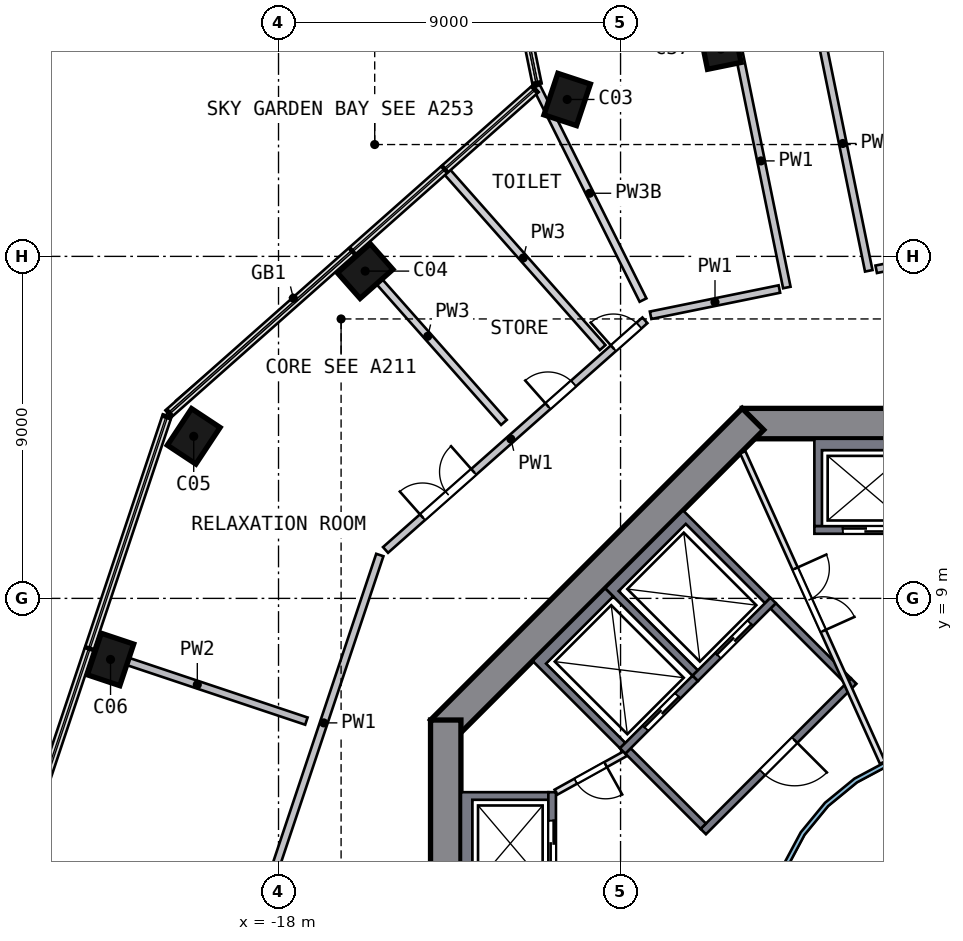
"""IFC4 building model, lengths in metres.
Left out: names, types, materials, properties, quantities, classifications, styles, units other than length and angle.
Written with IfcOpenShell. Run it as: python <this file> out.ifc"""

import sys

from ifc_helpers import new_model, si_unit, direction, frame, frame_2d, origin, origin_2d, place, context, subcontext, project, spatial, polyline, rectangle, outline, extrude, element, fill, save


model = new_model("IFC4")
c1 = context("Model", 3, precision=1e-05, world=origin(), true_north=direction((0.0, 1.0)))
c2 = subcontext(c1, "Body", "Model", "MODEL_VIEW")
j1 = project(units=[si_unit("LENGTHUNIT", "METRE"), si_unit("PLANEANGLEUNIT", "RADIAN")], contexts=[c1])
p1 = place(None, origin())
s1 = spatial("IfcSite", under=j1, at=p1, CompositionType="ELEMENT")
p2 = place(p1, origin())
s2 = spatial("IfcBuilding", under=s1, at=p2, CompositionType="ELEMENT")
p3 = place(p2, frame((0.0, 0.0, 81.0)))
s3 = spatial("IfcBuildingStorey", under=s2, at=p3, CompositionType="ELEMENT", Elevation=81.0)
p4 = place(p3, frame((-10.316, 22.171, 0.0), z_axis=(-0.073724949, -0.035072531, 0.996661703), x_axis=(0.313129185, 0.948026988, 0.056523832)))
e1 = element("IfcColumn", 1, at=p4, inside=s3, PredefinedType="COLUMN", context=c2, shape_type="SweptSolid", body=[
    extrude(rectangle(XDim=1.15, YDim=0.9, at=origin_2d()), origin(), (0.0, 0.0, 1.0), 4.706),
])
p5 = place(p3, frame((-15.649, 17.676, 0.0), z_axis=(-0.058640346, -0.052724417, 0.996885874), x_axis=(-0.746898066, -0.660246291, -0.078855026)))
e2 = element("IfcColumn", 2, at=p5, inside=s3, PredefinedType="COLUMN", context=c2, shape_type="SweptSolid", body=[
    extrude(rectangle(XDim=1.15, YDim=0.9, at=origin_2d()), origin(), (0.0, 0.0, 1.0), 4.705),
])
p6 = place(p3, frame((-20.179, 13.346, 0.0), z_axis=(-0.043999359, -0.067763164, 0.996730761), x_axis=(0.549832111, 0.831358719, 0.080791885)))
e3 = element("IfcColumn", 3, at=p6, inside=s3, PredefinedType="COLUMN", context=c2, shape_type="SweptSolid", body=[
    extrude(rectangle(XDim=1.15, YDim=0.9, at=origin_2d()), origin(), (0.0, 0.0, 1.0), 4.705),
])
p7 = place(p3, frame((-22.391, 7.483, 0.0), z_axis=(-0.024338376, -0.074987109, 0.996887444), x_axis=(-0.31573538, -0.945566595, -0.07883517)))
e4 = element("IfcColumn", 4, at=p7, inside=s3, PredefinedType="COLUMN", context=c2, shape_type="SweptSolid", body=[
    extrude(rectangle(XDim=1.15, YDim=0.9, at=origin_2d()), origin(), (0.0, 0.0, 1.0), 4.705),
])
p8 = place(p3, frame((-6.265, 23.48, 0.0), z_axis=(-0.078241786, -0.021583941, 0.996700736), x_axis=(-0.200169517, 0.979745823, 0.005503312)))
e5 = element("IfcColumn", 5, at=p8, inside=s3, PredefinedType="COLUMN", context=c2, shape_type="SweptSolid", body=[
    extrude(rectangle(XDim=0.9, YDim=0.9, at=origin_2d()), origin(), (0.0, 0.0, 1.0), 4.706),
])
p9 = place(p3, frame((5.799, 13.6, 0.0), z_axis=(0.0, 0.0, 1.0), x_axis=(-1.0, 0.0, 0.0)))
e6 = element("IfcWall", 6, at=p9, inside=s3, PredefinedType="SHEAR", context=c2, shape_type="SweptSolid", body=[
    extrude(rectangle(XDim=11.598, YDim=0.8, at=frame_2d((5.799, 0.0))), origin(), (0.0, 0.0, 1.0), 5.0),
])
p10 = place(p9, frame((4.899, 0.0, 0.0)))
e7 = element("IfcOpeningElement", 7, at=p10, cuts=e6, PredefinedType="OPENING", context=c2, shape_type="SweptSolid", body=[
    extrude(rectangle(XDim=1.8, YDim=2.1, at=frame_2d((0.9, 1.05))), frame((0.0, 0.41, 0.0), z_axis=(0.0, -1.0, 0.0), x_axis=(1.0, 0.0, 0.0)), (0.0, 0.0, 1.0), 0.82),
])
p11 = place(p3, frame((-5.516, 13.717, 0.0), z_axis=(0.0, 0.0, 1.0), x_axis=(-0.707106781, -0.707106781, 0.0)))
e8 = element("IfcWall", 8, at=p11, inside=s3, PredefinedType="SHEAR", context=c2, shape_type="SweptSolid", body=[
    extrude(rectangle(XDim=11.598, YDim=0.8, at=frame_2d((5.799, 0.0))), origin(), (0.0, 0.0, 1.0), 5.0),
])
p12 = place(p3, frame((-13.6, 5.799, 0.0), z_axis=(0.0, 0.0, 1.0), x_axis=(0.0, -1.0, 0.0)))
e9 = element("IfcWall", 9, at=p12, inside=s3, PredefinedType="SHEAR", context=c2, shape_type="SweptSolid", body=[
    extrude(rectangle(XDim=11.598, YDim=0.8, at=frame_2d((5.799, 0.0))), origin(), (0.0, 0.0, 1.0), 5.0),
])
p13 = place(p12, frame((4.899, 0.0, 0.0)))
e10 = element("IfcOpeningElement", 10, at=p13, cuts=e9, PredefinedType="OPENING", context=c2, shape_type="SweptSolid", body=[
    extrude(rectangle(XDim=1.8, YDim=2.1, at=frame_2d((0.9, 1.05))), frame((0.0, 0.41, 0.0), z_axis=(0.0, -1.0, 0.0), x_axis=(1.0, 0.0, 0.0)), (0.0, 0.0, 1.0), 0.82),
])
p14 = place(p3, origin())
e11 = element("IfcWall", 11, at=p14, inside=s3, PredefinedType="SOLIDWALL", context=c2, shape_type="SweptSolid", body=[
    extrude(outline(polyline([(-3.9, 10.9), (-3.9, 13.2), (-1.2, 13.2), (-1.2, 10.9), (-1.4, 10.9), (-1.4, 12.9), (-3.7, 12.9), (-3.7, 10.9), (-3.9, 10.9)])), origin(), (0.0, 0.0, 1.0), 4.69),
])
p15 = place(p3, frame((-1.2, 10.8, 0.0), z_axis=(0.0, 0.0, 1.0), x_axis=(-1.0, 0.0, 0.0)))
e12 = element("IfcWall", 12, at=p15, inside=s3, PredefinedType="SOLIDWALL", context=c2, shape_type="SweptSolid", body=[
    extrude(rectangle(XDim=2.7, YDim=0.2, at=frame_2d((1.35, 0.0))), origin(), (0.0, 0.0, 1.0), 4.69),
])
p16 = place(p15, frame((0.75, 0.0, 0.0)))
e13 = element("IfcOpeningElement", 13, at=p16, cuts=e12, PredefinedType="OPENING", context=c2, shape_type="SweptSolid", body=[
    extrude(rectangle(XDim=1.2, YDim=2.1, at=frame_2d((0.6, 1.05))), frame((0.0, 0.11, 0.0), z_axis=(0.0, -1.0, 0.0), x_axis=(1.0, 0.0, 0.0)), (0.0, 0.0, 1.0), 0.22),
])
p17 = place(p3, origin())
e14 = element("IfcWall", 14, at=p17, inside=s3, PredefinedType="SOLIDWALL", context=c2, shape_type="SweptSolid", body=[
    extrude(outline(polyline([(-13.2, 3.9), (-10.9, 3.9), (-10.9, 3.7), (-12.9, 3.7), (-12.9, 1.4), (-10.9, 1.4), (-10.9, 1.2), (-13.2, 1.2), (-13.2, 3.9)])), origin(), (0.0, 0.0, 1.0), 4.69),
])
p18 = place(p3, frame((-10.8, 1.2, 0.0), z_axis=(0.0, 0.0, 1.0), x_axis=(0.0, 1.0, 0.0)))
e15 = element("IfcWall", 15, at=p18, inside=s3, PredefinedType="SOLIDWALL", context=c2, shape_type="SweptSolid", body=[
    extrude(rectangle(XDim=2.7, YDim=0.2, at=frame_2d((1.35, 0.0))), origin(), (0.0, 0.0, 1.0), 4.69),
])
p19 = place(p18, frame((0.75, 0.0, 0.0)))
e16 = element("IfcOpeningElement", 16, at=p19, cuts=e15, PredefinedType="OPENING", context=c2, shape_type="SweptSolid", body=[
    extrude(rectangle(XDim=1.2, YDim=2.1, at=frame_2d((0.6, 1.05))), frame((0.0, 0.11, 0.0), z_axis=(0.0, -1.0, 0.0), x_axis=(1.0, 0.0, 0.0)), (0.0, 0.0, 1.0), 0.22),
])
p20 = place(p3, origin())
e17 = element("IfcWall", 17, at=p20, inside=s3, PredefinedType="SOLIDWALL", context=c2, shape_type="SweptSolid", body=[
    extrude(outline(polyline([(-9.405, 9.263), (-7.354, 11.314), (-5.056, 9.016), (-5.197, 8.874), (-7.283, 10.96), (-9.051, 9.192), (-6.965, 7.106), (-7.106, 6.965), (-9.405, 9.263)])), origin(), (0.0, 0.0, 1.0), 4.69),
])
p21 = place(p3, frame((-4.985, 8.945, 0.0), z_axis=(0.0, 0.0, 1.0), x_axis=(-0.707106781, -0.707106781, 0.0)))
e18 = element("IfcWall", 18, at=p21, inside=s3, PredefinedType="SOLIDWALL", context=c2, shape_type="SweptSolid", body=[
    extrude(rectangle(XDim=2.9, YDim=0.2, at=frame_2d((1.45, 0.0))), origin(), (0.0, 0.0, 1.0), 4.69),
])
p22 = place(p21, frame((0.85, 0.0, 0.0)))
e19 = element("IfcOpeningElement", 19, at=p22, cuts=e18, PredefinedType="OPENING", context=c2, shape_type="SweptSolid", body=[
    extrude(rectangle(XDim=1.2, YDim=2.1, at=frame_2d((0.6, 1.05))), frame((0.0, 0.11, 0.0), z_axis=(0.0, -1.0, 0.0), x_axis=(1.0, 0.0, 0.0)), (0.0, 0.0, 1.0), 0.22),
])
p23 = place(p3, origin())
e20 = element("IfcWall", 20, at=p23, inside=s3, PredefinedType="SOLIDWALL", context=c2, shape_type="SweptSolid", body=[
    extrude(outline(polyline([(-11.314, 7.354), (-9.405, 9.263), (-9.192, 9.051), (-10.96, 7.283), (-8.874, 5.197), (-9.016, 5.056), (-11.314, 7.354)])), origin(), (0.0, 0.0, 1.0), 4.69),
])
p24 = place(p3, frame((-7.036, 6.894, 0.0), z_axis=(0.0, 0.0, 1.0), x_axis=(-0.707106781, -0.707106781, 0.0)))
e21 = element("IfcWall", 21, at=p24, inside=s3, PredefinedType="SOLIDWALL", context=c2, shape_type="SweptSolid", body=[
    extrude(rectangle(XDim=2.7, YDim=0.2, at=frame_2d((1.35, 0.0))), origin(), (0.0, 0.0, 1.0), 4.69),
])
p25 = place(p24, frame((0.65, 0.0, 0.0)))
e22 = element("IfcOpeningElement", 22, at=p25, cuts=e21, PredefinedType="OPENING", context=c2, shape_type="SweptSolid", body=[
    extrude(rectangle(XDim=1.2, YDim=2.1, at=frame_2d((0.6, 1.05))), frame((0.0, 0.11, 0.0), z_axis=(0.0, -1.0, 0.0), x_axis=(1.0, 0.0, 0.0)), (0.0, 0.0, 1.0), 0.22),
])
p26 = place(p3, frame((-2.864, 6.823, 0.0), z_axis=(0.0, 0.0, 1.0), x_axis=(-0.707106781, -0.707106781, 0.0)))
e23 = element("IfcWall", 23, at=p26, inside=s3, PredefinedType="SOLIDWALL", context=c2, shape_type="SweptSolid", body=[
    extrude(rectangle(XDim=5.6, YDim=0.2, at=frame_2d((2.8, 0.0))), origin(), (0.0, 0.0, 1.0), 4.69),
])
p27 = place(p26, frame((2.2, 0.0, 0.0)))
e24 = element("IfcOpeningElement", 24, at=p27, cuts=e23, PredefinedType="OPENING", context=c2, shape_type="SweptSolid", body=[
    extrude(rectangle(XDim=1.2, YDim=2.1, at=frame_2d((0.6, 1.05))), frame((0.0, 0.11, 0.0), z_axis=(0.0, -1.0, 0.0), x_axis=(1.0, 0.0, 0.0)), (0.0, 0.0, 1.0), 0.22),
])
for number, where, z_axis, x_axis in (
    (25, (-3.005, 6.823, 0.0), (0.0, 0.0, 1.0), (-0.707, 0.707, 0.0)),
    (26, (-6.823, 3.005, 0.0), (0.0, 0.0, 1.0), (-0.707, 0.707, 0.0)),
):
    element("IfcWall", number, at=place(p3, frame(where, z_axis=z_axis, x_axis=x_axis)), inside=s3, PredefinedType="SOLIDWALL", context=c2, shape_type="SweptSolid", body=[
        extrude(rectangle(XDim=2.8, YDim=0.2, at=frame_2d((1.4, 0.0))), origin(), (0.0, 0.0, 1.0), 4.69),
    ])
p28 = place(p3, frame((-8.874, 4.914, 0.0), z_axis=(0.0, 0.0, 1.0), x_axis=(-0.874129705, -0.485692555, 0.0)))
e27 = element("IfcWall", 27, at=p28, inside=s3, PredefinedType="PARTITIONING", context=c2, shape_type="SweptSolid", body=[
    extrude(rectangle(XDim=2.089, YDim=0.15, at=frame_2d((1.044, 0.0))), origin(), (0.0, 0.0, 1.0), 4.69),
])
p29 = place(p28, frame((0.594, 0.0, 0.0)))
e28 = element("IfcOpeningElement", 28, at=p29, cuts=e27, PredefinedType="OPENING", context=c2, shape_type="SweptSolid", body=[
    extrude(rectangle(XDim=0.9, YDim=2.1, at=frame_2d((0.45, 1.05))), frame((0.0, 0.085, 0.0), z_axis=(0.0, -1.0, 0.0), x_axis=(1.0, 0.0, 0.0)), (0.0, 0.0, 1.0), 0.17),
])
p30 = place(p3, frame((-5.784, 12.844, 0.0), z_axis=(0.0, 0.0, 1.0), x_axis=(0.41058002, -0.91182457, 0.0)))
e29 = element("IfcWall", 29, at=p30, inside=s3, PredefinedType="PARTITIONING", context=c2, shape_type="SweptSolid", body=[
    extrude(rectangle(XDim=8.956, YDim=0.15, at=frame_2d((4.478, 0.0))), origin(), (0.0, 0.0, 1.0), 4.69),
])
p31 = place(p30, frame((3.356, 0.0, 0.0)))
e30 = element("IfcOpeningElement", 30, at=p31, cuts=e29, PredefinedType="OPENING", context=c2, shape_type="SweptSolid", body=[
    extrude(rectangle(XDim=1.8, YDim=2.1, at=frame_2d((0.9, 1.05))), frame((0.0, 0.085, 0.0), z_axis=(0.0, -1.0, 0.0), x_axis=(1.0, 0.0, 0.0)), (0.0, 0.0, 1.0), 0.17),
])
p32 = place(p3, origin())
e31 = element("IfcWall", 31, at=p32, inside=s3, PredefinedType="SOLIDWALL", context=c2, shape_type="SweptSolid", body=[
    extrude(outline(polyline([(5.021, -0.999), (4.73, -1.959), (4.257, -2.844), (3.62, -3.62), (2.844, -4.257), (1.959, -4.73), (0.999, -5.021), (0.0, -5.12), (-0.999, -5.021), (-1.959, -4.73), (-2.844, -4.257), (-3.62, -3.62), (-4.257, -2.844), (-4.73, -1.959), (-5.021, -0.999), (-5.12, 0.0), (-5.021, 0.999), (-4.73, 1.959), (-4.257, 2.844), (-3.62, 3.62), (-2.844, 4.257), (-1.959, 4.73), (-0.999, 5.021), (0.0, 5.12), (0.999, 5.021), (1.959, 4.73), (2.844, 4.257), (3.62, 3.62), (4.257, 2.844), (4.73, 1.959), (5.021, 0.999), (5.12, 0.0), (5.021, -0.999)]), holes=[polyline([(4.904, 0.976), (4.619, 1.913), (4.157, 2.778), (3.535, 3.535), (2.778, 4.157), (1.913, 4.619), (0.976, 4.904), (0.0, 5.0), (-0.976, 4.904), (-1.913, 4.619), (-2.778, 4.157), (-3.535, 3.535), (-4.157, 2.778), (-4.619, 1.913), (-4.904, 0.976), (-5.0, 0.0), (-4.904, -0.976), (-4.619, -1.913), (-4.157, -2.778), (-3.535, -3.535), (-2.778, -4.157), (-1.913, -4.619), (-0.976, -4.904), (0.0, -5.0), (0.976, -4.904), (1.913, -4.619), (2.778, -4.157), (3.535, -3.535), (4.157, -2.778), (4.619, -1.913), (4.904, -0.976), (5.0, 0.0), (4.904, 0.976)])]), origin(), (0.0, 0.0, 1.0), 4.69),
])
p33 = place(p3, frame((-15.334, 10.141, 0.0), z_axis=(0.0, 0.0, 1.0), x_axis=(-0.316982448, -0.948431404, 0.0)))
e32 = element("IfcWall", 32, at=p33, inside=s3, PredefinedType="SOLIDWALL", context=c2, shape_type="SweptSolid", body=[
    extrude(rectangle(XDim=9.316, YDim=0.2, at=frame_2d((4.658, 0.0))), origin(), (0.0, 0.0, 1.0), 4.69),
])
p34 = place(p3, frame((-15.184, 10.275, 0.0), z_axis=(0.0, 0.0, 1.0), x_axis=(0.748733244, 0.662871428, 0.0)))
e33 = element("IfcWall", 33, at=p34, inside=s3, PredefinedType="SOLIDWALL", context=c2, shape_type="SweptSolid", body=[
    extrude(rectangle(XDim=9.116, YDim=0.2, at=frame_2d((4.558, 0.0))), origin(), (0.0, 0.0, 1.0), 4.69),
])
p35 = place(p34, frame((1.3, 0.0, 0.0)))
e34 = element("IfcOpeningElement", 34, at=p35, cuts=e33, PredefinedType="OPENING", context=c2, shape_type="SweptSolid", body=[
    extrude(rectangle(XDim=1.8, YDim=2.1, at=frame_2d((0.9, 1.05))), frame((0.0, 0.11, 0.0), z_axis=(0.0, -1.0, 0.0), x_axis=(1.0, 0.0, 0.0)), (0.0, 0.0, 1.0), 0.22),
])
p36 = place(p34, frame((8.008, 0.0, 0.0)))
e35 = element("IfcOpeningElement", 35, at=p36, cuts=e33, PredefinedType="OPENING", context=c2, shape_type="SweptSolid", body=[
    extrude(rectangle(XDim=0.9, YDim=2.1, at=frame_2d((0.45, 1.05))), frame((0.0, 0.11, 0.0), z_axis=(0.0, -1.0, 0.0), x_axis=(1.0, 0.0, 0.0)), (0.0, 0.0, 1.0), 0.22),
])
p37 = place(p34, frame((5.708, 0.0, 0.0)))
e36 = element("IfcOpeningElement", 36, at=p37, cuts=e33, PredefinedType="OPENING", context=c2, shape_type="SweptSolid", body=[
    extrude(rectangle(XDim=0.9, YDim=2.1, at=frame_2d((0.45, 1.05))), frame((0.0, 0.11, 0.0), z_axis=(0.0, -1.0, 0.0), x_axis=(1.0, 0.0, 0.0)), (0.0, 0.0, 1.0), 0.22),
])
p38 = place(p3, frame((-4.82, 17.141, 0.0), z_axis=(0.0, 0.0, 1.0), x_axis=(-0.979840736, -0.199780208, 0.0)))
e37 = element("IfcWall", 37, at=p38, inside=s3, PredefinedType="SOLIDWALL", context=c2, shape_type="SweptSolid", body=[
    extrude(rectangle(XDim=3.458, YDim=0.2, at=frame_2d((1.729, 0.0))), origin(), (0.0, 0.0, 1.0), 4.69),
])
p39 = place(p3, frame((-4.625, 17.181, 0.0), z_axis=(0.0, 0.0, 1.0), x_axis=(-0.199700098, 0.979857066, 0.0)))
e38 = element("IfcWall", 38, at=p39, inside=s3, PredefinedType="SOLIDWALL", context=c2, shape_type="SweptSolid", body=[
    extrude(rectangle(XDim=14.392, YDim=0.2, at=frame_2d((7.196, 0.0))), origin(), (0.0, 0.0, 1.0), 4.69),
])
p40 = place(p39, frame((7.0, 0.0, 0.0)))
e39 = element("IfcOpeningElement", 39, at=p40, cuts=e38, PredefinedType="OPENING", context=c2, shape_type="SweptSolid", body=[
    extrude(rectangle(XDim=1.0, YDim=2.1, at=frame_2d((0.5, 1.05))), frame((0.0, 0.11, 0.0), z_axis=(0.0, -1.0, 0.0), x_axis=(1.0, 0.0, 0.0)), (0.0, 0.0, 1.0), 0.22),
])
p41 = place(p3, frame((-5.342, 31.72, 0.0), z_axis=(0.0, 0.0, 1.0), x_axis=(0.199694078, -0.979858293, 0.0)))
e40 = element("IfcWall", 40, at=p41, inside=s3, PredefinedType="SOLIDWALL", context=c2, shape_type="SweptSolid", body=[
    extrude(rectangle(XDim=14.39, YDim=0.2, at=frame_2d((7.195, 0.0))), origin(), (0.0, 0.0, 1.0), 4.69),
])
p42 = place(p41, frame((5.55, 0.0, 0.0)))
e41 = element("IfcOpeningElement", 41, at=p42, cuts=e40, PredefinedType="OPENING", context=c2, shape_type="SweptSolid", body=[
    extrude(rectangle(XDim=1.8, YDim=2.1, at=frame_2d((0.9, 1.05))), frame((0.0, 0.11, 0.0), z_axis=(0.0, -1.0, 0.0), x_axis=(1.0, 0.0, 0.0)), (0.0, 0.0, 1.0), 0.22),
])
p43 = place(p3, frame((1.116, 18.351, 0.0), z_axis=(0.0, 0.0, 1.0), x_axis=(-0.979854553, -0.19971243, 0.0)))
e42 = element("IfcWall", 42, at=p43, inside=s3, PredefinedType="SOLIDWALL", context=c2, shape_type="SweptSolid", body=[
    extrude(rectangle(XDim=3.458, YDim=0.2, at=frame_2d((1.729, 0.0))), origin(), (0.0, 0.0, 1.0), 4.69),
])
p44 = place(p3, frame((-17.267, 5.771, 0.0), z_axis=(0.0, 0.0, 1.0), x_axis=(-0.948436957, 0.316965832, 0.0)))
e43 = element("IfcWall", 43, at=p44, inside=s3, PredefinedType="SOLIDWALL", context=c2, shape_type="SweptSolid", body=[
    extrude(rectangle(XDim=6.052, YDim=0.2, at=frame_2d((3.026, 0.0))), origin(), (0.0, 0.0, 1.0), 4.69),
])
p45 = place(p3, frame((-16.08, 18.163, 0.0), z_axis=(0.0, 0.0, 1.0), x_axis=(0.662885401, -0.748720872, 0.0)))
e44 = element("IfcWall", 44, at=p45, inside=s3, PredefinedType="SOLIDWALL", context=c2, shape_type="SweptSolid", body=[
    extrude(rectangle(XDim=6.053, YDim=0.2, at=frame_2d((3.026, 0.0))), origin(), (0.0, 0.0, 1.0), 4.69),
])
p46 = place(p3, frame((-9.471, 15.6, 0.0), z_axis=(0.0, 0.0, 1.0), x_axis=(-0.662863979, 0.748739838, 0.0)))
e45 = element("IfcWall", 45, at=p46, inside=s3, PredefinedType="SOLIDWALL", context=c2, shape_type="SweptSolid", body=[
    extrude(rectangle(XDim=6.3, YDim=0.2, at=frame_2d((3.15, 0.0))), origin(), (0.0, 0.0, 1.0), 4.69),
])
p47 = place(p3, frame((-8.409, 16.851, 0.0), z_axis=(0.0, 0.0, 1.0), x_axis=(-0.446513898, 0.894776698, 0.0)))
e46 = element("IfcWall", 46, at=p47, inside=s3, PredefinedType="SOLIDWALL", context=c2, shape_type="SweptSolid", body=[
    extrude(rectangle(XDim=6.282, YDim=0.2, at=frame_2d((3.141, 0.0))), origin(), (0.0, 0.0, 1.0), 4.19),
])
p48 = place(p16, origin())
e47 = element("IfcDoor", 47, at=p48, inside=s3, OperationType="DOUBLE_DOOR_SLIDING", PredefinedType="DOOR", context=c2, shape_type="SweptSolid", body=[
    extrude(rectangle(XDim=1.2, YDim=2.1, at=frame_2d((0.6, 1.05))), frame((0.0, 0.025, 0.0), z_axis=(0.0, -1.0, 0.0), x_axis=(1.0, 0.0, 0.0)), (0.0, 0.0, 1.0), 0.05),
])
fill(e13, e47)
p49 = place(p19, origin())
e48 = element("IfcDoor", 48, at=p49, inside=s3, OperationType="DOUBLE_DOOR_SLIDING", PredefinedType="DOOR", context=c2, shape_type="SweptSolid", body=[
    extrude(rectangle(XDim=1.2, YDim=2.1, at=frame_2d((0.6, 1.05))), frame((0.0, 0.025, 0.0), z_axis=(0.0, -1.0, 0.0), x_axis=(1.0, 0.0, 0.0)), (0.0, 0.0, 1.0), 0.05),
])
fill(e16, e48)
p50 = place(p22, origin())
e49 = element("IfcDoor", 49, at=p50, inside=s3, OperationType="DOUBLE_DOOR_SLIDING", PredefinedType="DOOR", context=c2, shape_type="SweptSolid", body=[
    extrude(rectangle(XDim=1.2, YDim=2.1, at=frame_2d((0.6, 1.05))), frame((0.0, 0.025, 0.0), z_axis=(0.0, -1.0, 0.0), x_axis=(1.0, 0.0, 0.0)), (0.0, 0.0, 1.0), 0.05),
])
fill(e19, e49)
p51 = place(p25, origin())
e50 = element("IfcDoor", 50, at=p51, inside=s3, OperationType="DOUBLE_DOOR_SLIDING", PredefinedType="DOOR", context=c2, shape_type="SweptSolid", body=[
    extrude(rectangle(XDim=1.2, YDim=2.1, at=frame_2d((0.6, 1.05))), frame((0.0, 0.025, 0.0), z_axis=(0.0, -1.0, 0.0), x_axis=(1.0, 0.0, 0.0)), (0.0, 0.0, 1.0), 0.05),
])
fill(e22, e50)
p52 = place(p27, origin())
e51 = element("IfcDoor", 51, at=p52, inside=s3, OperationType="SINGLE_SWING_LEFT", PredefinedType="DOOR", context=c2, shape_type="SweptSolid", body=[
    extrude(rectangle(XDim=1.2, YDim=2.1, at=frame_2d((0.6, 1.05))), frame((0.0, 0.025, 0.0), z_axis=(0.0, -1.0, 0.0), x_axis=(1.0, 0.0, 0.0)), (0.0, 0.0, 1.0), 0.05),
])
fill(e24, e51)
p53 = place(p29, origin())
e52 = element("IfcDoor", 52, at=p53, inside=s3, OperationType="SINGLE_SWING_LEFT", PredefinedType="DOOR", context=c2, shape_type="SweptSolid", body=[
    extrude(rectangle(XDim=0.9, YDim=2.1, at=frame_2d((0.45, 1.05))), frame((0.0, 0.025, 0.0), z_axis=(0.0, -1.0, 0.0), x_axis=(1.0, 0.0, 0.0)), (0.0, 0.0, 1.0), 0.05),
])
fill(e28, e52)
p54 = place(p31, origin())
e53 = element("IfcDoor", 53, at=p54, inside=s3, OperationType="DOUBLE_DOOR_SINGLE_SWING", PredefinedType="DOOR", context=c2, shape_type="SweptSolid", body=[
    extrude(rectangle(XDim=1.8, YDim=2.1, at=frame_2d((0.9, 1.05))), frame((0.0, 0.025, 0.0), z_axis=(0.0, -1.0, 0.0), x_axis=(1.0, 0.0, 0.0)), (0.0, 0.0, 1.0), 0.05),
])
fill(e30, e53)
p55 = place(p35, origin())
e54 = element("IfcDoor", 54, at=p55, inside=s3, OperationType="DOUBLE_DOOR_SINGLE_SWING", PredefinedType="DOOR", context=c2, shape_type="SweptSolid", body=[
    extrude(rectangle(XDim=1.8, YDim=2.1, at=frame_2d((0.9, 1.05))), frame((0.0, 0.025, 0.0), z_axis=(0.0, -1.0, 0.0), x_axis=(1.0, 0.0, 0.0)), (0.0, 0.0, 1.0), 0.05),
])
fill(e34, e54)
p56 = place(p36, origin())
e55 = element("IfcDoor", 55, at=p56, inside=s3, OperationType="SINGLE_SWING_LEFT", PredefinedType="DOOR", context=c2, shape_type="SweptSolid", body=[
    extrude(rectangle(XDim=0.9, YDim=2.1, at=frame_2d((0.45, 1.05))), frame((0.0, 0.025, 0.0), z_axis=(0.0, -1.0, 0.0), x_axis=(1.0, 0.0, 0.0)), (0.0, 0.0, 1.0), 0.05),
])
fill(e35, e55)
p57 = place(p37, origin())
e56 = element("IfcDoor", 56, at=p57, inside=s3, OperationType="SINGLE_SWING_LEFT", PredefinedType="DOOR", context=c2, shape_type="SweptSolid", body=[
    extrude(rectangle(XDim=0.9, YDim=2.1, at=frame_2d((0.45, 1.05))), frame((0.0, 0.025, 0.0), z_axis=(0.0, -1.0, 0.0), x_axis=(1.0, 0.0, 0.0)), (0.0, 0.0, 1.0), 0.05),
])
fill(e36, e56)
save(model, sys.argv[1])
